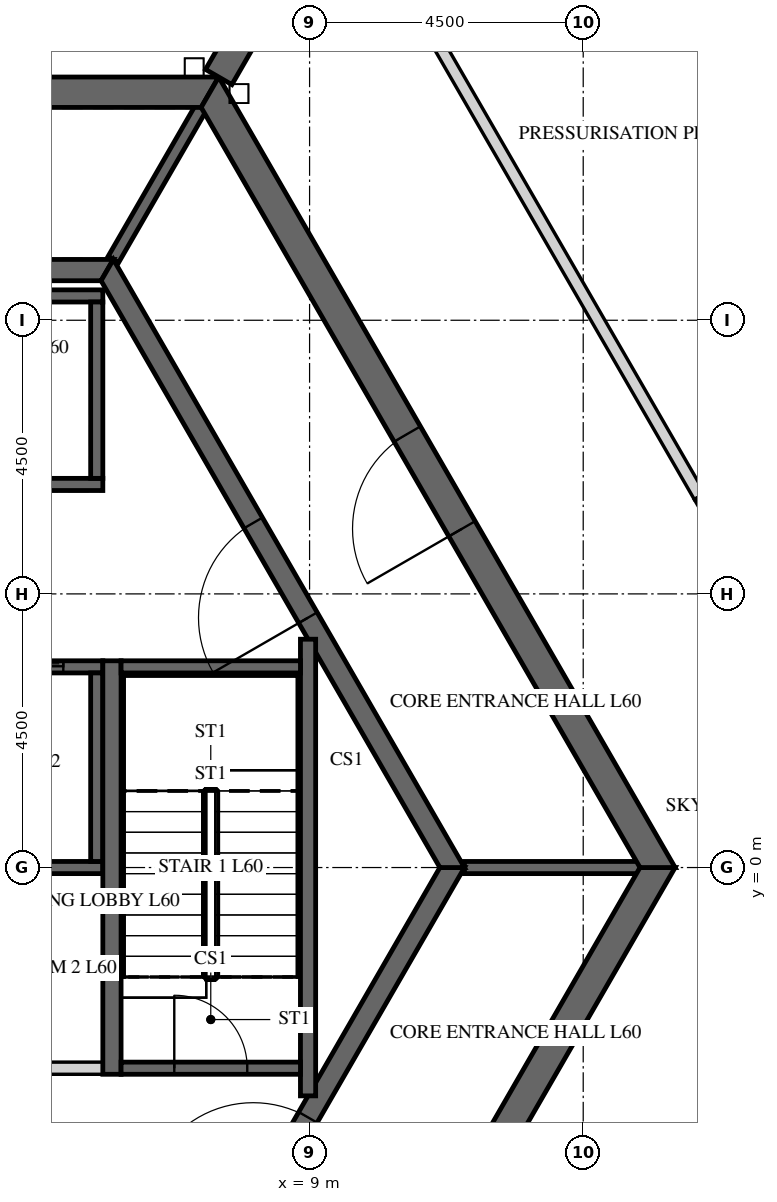
"""IFC4 building model, lengths in metres.
Left out: names, types, materials, properties, quantities, classifications, styles, units other than length and angle.
Written with IfcOpenShell. Run it as: python <this file> out.ifc"""

import sys

from ifc_helpers import new_model, si_unit, direction, frame, frame_2d, origin, place, context, subcontext, project, spatial, polyline, rectangle, outline, extrude, element, fill, save


model = new_model("IFC4")
c1 = context("Model", 3, precision=1e-05, world=origin(), true_north=direction((0.0, 1.0)))
c2 = subcontext(c1, "Body", "Model", "MODEL_VIEW")
j1 = project(units=[si_unit("LENGTHUNIT", "METRE"), si_unit("PLANEANGLEUNIT", "RADIAN")], contexts=[c1])
p1 = place(None, origin())
s1 = spatial("IfcSite", under=j1, at=p1, CompositionType="ELEMENT")
p2 = place(p1, origin())
s2 = spatial("IfcBuilding", under=s1, at=p2, CompositionType="ELEMENT")
p3 = place(p2, frame((0.0, 0.0, 250.2)))
s3 = spatial("IfcBuildingStorey", under=s2, at=p3, CompositionType="ELEMENT", Elevation=250.2)
p4 = place(p3, frame((7.361, -12.75, -0.3), z_axis=(0.0, 0.0, 1.0), x_axis=(0.50000571537, 0.866022103989, 0.0)))
e1 = element("IfcWall", 1, at=p4, inside=s3, PredefinedType="SHEAR", context=c2, shape_type="SweptSolid", body=[
    extrude(outline(polyline([(-0.144, -0.25), (14.867, -0.25), (14.578, 0.25), (0.144, 0.25), (-0.144, -0.25)])), origin(), (0.0, 0.0, 1.0), 5.8),
])
p5 = place(p4, frame((6.49, 0.0, 0.3)))
e2 = element("IfcOpeningElement", 2, at=p5, cuts=e1, PredefinedType="OPENING", context=c2, shape_type="SweptSolid", body=[
    extrude(rectangle(XDim=1.8, YDim=2.4, at=frame_2d((0.9, 1.2))), frame((0.0, 0.26, 0.0), z_axis=(0.0, -1.0, 0.0), x_axis=(1.0, 0.0, 0.0)), (0.0, 0.0, 1.0), 0.52),
])
p6 = place(p3, frame((14.722, 0.0, -0.3), z_axis=(0.0, 0.0, 1.0), x_axis=(-0.50000571537, 0.866022103989, 0.0)))
e3 = element("IfcWall", 3, at=p6, inside=s3, PredefinedType="SHEAR", context=c2, shape_type="SweptSolid", body=[
    extrude(outline(polyline([(-0.144, -0.25), (14.867, -0.25), (14.578, 0.25), (0.144, 0.25), (-0.144, -0.25)])), origin(), (0.0, 0.0, 1.0), 5.8),
])
p7 = place(p6, frame((6.432, 0.0, 0.3)))
e4 = element("IfcOpeningElement", 4, at=p7, cuts=e3, PredefinedType="OPENING", context=c2, shape_type="SweptSolid", body=[
    extrude(rectangle(XDim=1.8, YDim=2.4, at=frame_2d((0.9, 1.2))), frame((0.0, 0.26, 0.0), z_axis=(0.0, -1.0, 0.0), x_axis=(1.0, 0.0, 0.0)), (0.0, 0.0, 1.0), 0.52),
])
p8 = place(p3, frame((7.361, 12.75, -0.3), z_axis=(0.0, 0.0, 1.0), x_axis=(-1.0, 0.0, 0.0)))
e5 = element("IfcWall", 5, at=p8, inside=s3, PredefinedType="SHEAR", context=c2, shape_type="SweptSolid", body=[
    extrude(outline(polyline([(-0.144, -0.25), (14.866, -0.25), (14.578, 0.25), (0.144, 0.25), (-0.144, -0.25)])), origin(), (0.0, 0.0, 1.0), 5.8),
])
p9 = place(p8, frame((6.761, 0.0, 0.3)))
e6 = element("IfcOpeningElement", 6, at=p9, cuts=e5, PredefinedType="OPENING", context=c2, shape_type="SweptSolid", body=[
    extrude(rectangle(XDim=1.2, YDim=2.4, at=frame_2d((0.6, 1.2))), frame((0.0, 0.26, 0.0), z_axis=(0.0, -1.0, 0.0), x_axis=(1.0, 0.0, 0.0)), (0.0, 0.0, 1.0), 0.52),
])
p10 = place(p3, frame((7.506, 13.0, -0.3), z_axis=(0.0, 0.0, 1.0), x_axis=(0.499988271576, 0.866032175087, 0.0)))
e7 = element("IfcWall", 7, at=p10, inside=s3, PredefinedType="SHEAR", context=c2, shape_type="SweptSolid", body=[
    extrude(rectangle(XDim=15.424, YDim=0.5, at=frame_2d((7.712, 0.0))), origin(), (0.0, 0.0, 1.0), 5.8),
])
p11 = place(p10, frame((6.812, 0.0, 0.3)))
e8 = element("IfcOpeningElement", 8, at=p11, cuts=e7, PredefinedType="OPENING", context=c2, shape_type="SweptSolid", body=[
    extrude(rectangle(XDim=1.8, YDim=2.4, at=frame_2d((0.9, 1.2))), frame((0.0, 0.26, 0.0), z_axis=(0.0, -1.0, 0.0), x_axis=(1.0, 0.0, 0.0)), (0.0, 0.0, 1.0), 0.52),
])
p12 = place(p3, frame((5.673, -9.825, -0.3), z_axis=(0.0, 0.0, 1.0), x_axis=(0.499995046907, 0.866028263435, 0.0)))
e9 = element("IfcWall", 9, at=p12, inside=s3, PredefinedType="SHEAR", context=c2, shape_type="SweptSolid", body=[
    extrude(outline(polyline([(-0.101, -0.175), (11.446, -0.175), (11.244, 0.175), (0.101, 0.175), (-0.101, -0.175)])), origin(), (0.0, 0.0, 1.0), 5.8),
])
p13 = place(p12, frame((4.801, 0.0, 0.3)))
e10 = element("IfcOpeningElement", 10, at=p13, cuts=e9, PredefinedType="OPENING", context=c2, shape_type="SweptSolid", body=[
    extrude(rectangle(XDim=1.8, YDim=2.4, at=frame_2d((0.9, 1.2))), frame((0.0, 0.185, 0.0), z_axis=(0.0, -1.0, 0.0), x_axis=(1.0, 0.0, 0.0)), (0.0, 0.0, 1.0), 0.37),
])
p14 = place(p3, frame((11.345, 0.0, -0.3), z_axis=(0.0, 0.0, 1.0), x_axis=(-0.499995046907, 0.866028263435, 0.0)))
e11 = element("IfcWall", 11, at=p14, inside=s3, PredefinedType="SHEAR", context=c2, shape_type="SweptSolid", body=[
    extrude(outline(polyline([(-0.101, -0.175), (11.446, -0.175), (11.244, 0.175), (0.101, 0.175), (-0.101, -0.175)])), origin(), (0.0, 0.0, 1.0), 5.8),
])
p15 = place(p14, frame((4.744, 0.0, 0.3)))
e12 = element("IfcOpeningElement", 12, at=p15, cuts=e11, PredefinedType="OPENING", context=c2, shape_type="SweptSolid", body=[
    extrude(rectangle(XDim=1.8, YDim=2.4, at=frame_2d((0.9, 1.2))), frame((0.0, 0.185, 0.0), z_axis=(0.0, -1.0, 0.0), x_axis=(1.0, 0.0, 0.0)), (0.0, 0.0, 1.0), 0.37),
])
p16 = place(p3, frame((5.673, 9.825, -0.3), z_axis=(0.0, 0.0, 1.0), x_axis=(-1.0, 0.0, 0.0)))
e13 = element("IfcWall", 13, at=p16, inside=s3, PredefinedType="SHEAR", context=c2, shape_type="SweptSolid", body=[
    extrude(outline(polyline([(-0.101, -0.175), (11.446, -0.175), (11.244, 0.175), (0.101, 0.175), (-0.101, -0.175)])), origin(), (0.0, 0.0, 1.0), 5.8),
])
p17 = place(p3, frame((-5.6, 6.3, -0.25), z_axis=(0.0, 0.0, 1.0), x_axis=(1.0, 0.0, 0.0)))
e14 = element("IfcWall", 14, at=p17, inside=s3, PredefinedType="SHEAR", context=c2, shape_type="SweptSolid", body=[
    extrude(rectangle(XDim=11.2, YDim=0.2, at=frame_2d((5.6, 0.0))), origin(), (0.0, 0.0, 1.0), 5.75),
])
p18 = place(p17, frame((8.45, 0.0, 0.25)))
e15 = element("IfcOpeningElement", 15, at=p18, cuts=e14, PredefinedType="OPENING", context=c2, shape_type="SweptSolid", body=[
    extrude(rectangle(XDim=0.9, YDim=2.1, at=frame_2d((0.45, 1.05))), frame((0.0, 0.11, 0.0), z_axis=(0.0, -1.0, 0.0), x_axis=(1.0, 0.0, 0.0)), (0.0, 0.0, 1.0), 0.22),
])
p19 = place(p17, frame((0.65, 0.0, 0.25)))
e16 = element("IfcOpeningElement", 16, at=p19, cuts=e14, PredefinedType="OPENING", context=c2, shape_type="SweptSolid", body=[
    extrude(rectangle(XDim=1.1, YDim=2.1, at=frame_2d((0.55, 1.05))), frame((0.0, 0.11, 0.0), z_axis=(0.0, -1.0, 0.0), x_axis=(1.0, 0.0, 0.0)), (0.0, 0.0, 1.0), 0.22),
])
p20 = place(p17, frame((2.85, 0.0, 0.25)))
e17 = element("IfcOpeningElement", 17, at=p20, cuts=e14, PredefinedType="OPENING", context=c2, shape_type="SweptSolid", body=[
    extrude(rectangle(XDim=1.1, YDim=2.1, at=frame_2d((0.55, 1.05))), frame((0.0, 0.11, 0.0), z_axis=(0.0, -1.0, 0.0), x_axis=(1.0, 0.0, 0.0)), (0.0, 0.0, 1.0), 0.22),
])
p21 = place(p17, frame((5.05, 0.0, 0.25)))
e18 = element("IfcOpeningElement", 18, at=p21, cuts=e14, PredefinedType="OPENING", context=c2, shape_type="SweptSolid", body=[
    extrude(rectangle(XDim=1.1, YDim=2.1, at=frame_2d((0.55, 1.05))), frame((0.0, 0.11, 0.0), z_axis=(0.0, -1.0, 0.0), x_axis=(1.0, 0.0, 0.0)), (0.0, 0.0, 1.0), 0.22),
])
p22 = place(p3, frame((-5.6, 9.4, -0.25), z_axis=(0.0, 0.0, 1.0), x_axis=(1.0, 0.0, 0.0)))
e19 = element("IfcWall", 19, at=p22, inside=s3, PredefinedType="SHEAR", context=c2, shape_type="SweptSolid", body=[
    extrude(rectangle(XDim=11.2, YDim=0.2, at=frame_2d((5.6, 0.0))), origin(), (0.0, 0.0, 1.0), 5.75),
])
p23 = place(p3, frame((5.5, 6.4, -0.25), z_axis=(0.0, 0.0, 1.0), x_axis=(0.0, 1.0, 0.0)))
e20 = element("IfcWall", 20, at=p23, inside=s3, PredefinedType="SHEAR", context=c2, shape_type="SweptSolid", body=[
    extrude(rectangle(XDim=2.9, YDim=0.2, at=frame_2d((1.45, 0.0))), origin(), (0.0, 0.0, 1.0), 5.75),
])
p24 = place(p3, frame((-5.6, 3.3, -0.25), z_axis=(0.0, 0.0, 1.0), x_axis=(1.0, 0.0, 0.0)))
e21 = element("IfcWall", 21, at=p24, inside=s3, PredefinedType="SHEAR", context=c2, shape_type="SweptSolid", body=[
    extrude(rectangle(XDim=11.2, YDim=0.2, at=frame_2d((5.6, 0.0))), origin(), (0.0, 0.0, 1.0), 5.75),
])
p25 = place(p24, frame((0.65, 0.0, 0.25)))
e22 = element("IfcOpeningElement", 22, at=p25, cuts=e21, PredefinedType="OPENING", context=c2, shape_type="SweptSolid", body=[
    extrude(rectangle(XDim=1.1, YDim=2.1, at=frame_2d((0.55, 1.05))), frame((0.0, 0.11, 0.0), z_axis=(0.0, -1.0, 0.0), x_axis=(1.0, 0.0, 0.0)), (0.0, 0.0, 1.0), 0.22),
])
p26 = place(p24, frame((2.85, 0.0, 0.25)))
e23 = element("IfcOpeningElement", 23, at=p26, cuts=e21, PredefinedType="OPENING", context=c2, shape_type="SweptSolid", body=[
    extrude(rectangle(XDim=1.1, YDim=2.1, at=frame_2d((0.55, 1.05))), frame((0.0, 0.11, 0.0), z_axis=(0.0, -1.0, 0.0), x_axis=(1.0, 0.0, 0.0)), (0.0, 0.0, 1.0), 0.22),
])
p27 = place(p24, frame((5.05, 0.0, 0.25)))
e24 = element("IfcOpeningElement", 24, at=p27, cuts=e21, PredefinedType="OPENING", context=c2, shape_type="SweptSolid", body=[
    extrude(rectangle(XDim=1.1, YDim=2.1, at=frame_2d((0.55, 1.05))), frame((0.0, 0.11, 0.0), z_axis=(0.0, -1.0, 0.0), x_axis=(1.0, 0.0, 0.0)), (0.0, 0.0, 1.0), 0.22),
])
p28 = place(p24, frame((7.25, 0.0, 0.25)))
e25 = element("IfcOpeningElement", 25, at=p28, cuts=e21, PredefinedType="OPENING", context=c2, shape_type="SweptSolid", body=[
    extrude(rectangle(XDim=1.1, YDim=2.1, at=frame_2d((0.55, 1.05))), frame((0.0, 0.11, 0.0), z_axis=(0.0, -1.0, 0.0), x_axis=(1.0, 0.0, 0.0)), (0.0, 0.0, 1.0), 0.22),
])
p29 = place(p24, frame((9.45, 0.0, 0.25)))
e26 = element("IfcOpeningElement", 26, at=p29, cuts=e21, PredefinedType="OPENING", context=c2, shape_type="SweptSolid", body=[
    extrude(rectangle(XDim=1.1, YDim=2.1, at=frame_2d((0.55, 1.05))), frame((0.0, 0.11, 0.0), z_axis=(0.0, -1.0, 0.0), x_axis=(1.0, 0.0, 0.0)), (0.0, 0.0, 1.0), 0.22),
])
p30 = place(p3, frame((-5.6, 0.0, -0.25), z_axis=(0.0, 0.0, 1.0), x_axis=(1.0, 0.0, 0.0)))
e27 = element("IfcWall", 27, at=p30, inside=s3, PredefinedType="SHEAR", context=c2, shape_type="SweptSolid", body=[
    extrude(rectangle(XDim=11.2, YDim=0.2, at=frame_2d((5.6, 0.0))), origin(), (0.0, 0.0, 1.0), 5.75),
])
p31 = place(p3, frame((5.5, 0.1, -0.25), z_axis=(0.0, 0.0, 1.0), x_axis=(0.0, 1.0, 0.0)))
e28 = element("IfcWall", 28, at=p31, inside=s3, PredefinedType="SHEAR", context=c2, shape_type="SweptSolid", body=[
    extrude(rectangle(XDim=3.1, YDim=0.2, at=frame_2d((1.55, 0.0))), origin(), (0.0, 0.0, 1.0), 5.75),
])
p32 = place(p3, frame((0.1, -3.3, 0.0), z_axis=(0.0, 0.0, 1.0), x_axis=(1.0, 0.0, 0.0)))
e29 = element("IfcWall", 29, at=p32, inside=s3, PredefinedType="PARTITIONING", context=c2, shape_type="SweptSolid", body=[
    extrude(rectangle(XDim=5.5, YDim=0.2, at=frame_2d((2.75, 0.0))), origin(), (0.0, 0.0, 1.0), 5.5),
])
p33 = place(p32, frame((2.3, 0.0, 0.0)))
e30 = element("IfcOpeningElement", 30, at=p33, cuts=e29, PredefinedType="OPENING", context=c2, shape_type="SweptSolid", body=[
    extrude(rectangle(XDim=0.9, YDim=2.1, at=frame_2d((0.45, 1.05))), frame((0.0, 0.11, 0.0), z_axis=(0.0, -1.0, 0.0), x_axis=(1.0, 0.0, 0.0)), (0.0, 0.0, 1.0), 0.22),
])
for number, where, z_axis, x_axis in (
    (31, (11.547, 0.0, -0.3), (0.0, 0.0, 1.0), (1.0, 0.0, 0.0)),
    (32, (5.773, 10.0, -0.3), (0.0, 0.0, 1.0), (0.5, 0.866, 0.0)),
):
    element("IfcWall", number, at=place(p3, frame(where, z_axis=z_axis, x_axis=x_axis)), inside=s3, PredefinedType="SHEAR", context=c2, shape_type="SweptSolid", body=[
        extrude(rectangle(XDim=2.887, YDim=0.2, at=frame_2d((1.443, 0.0))), origin(), (0.0, 0.0, 1.0), 5.8),
    ])
p34 = place(p3, frame((5.75, -3.4, -0.25), z_axis=(0.0, 0.0, 1.0), x_axis=(0.0, 1.0, 0.0)))
e33 = element("IfcWall", 33, at=p34, inside=s3, PredefinedType="SHEAR", context=c2, shape_type="SweptSolid", body=[
    extrude(rectangle(XDim=6.8, YDim=0.3, at=frame_2d((3.4, 0.0))), origin(), (0.0, 0.0, 1.0), 5.75),
])
p35 = place(p3, frame((8.975, -3.755, -0.25), z_axis=(0.0, 0.0, 1.0), x_axis=(0.0, 1.0, 0.0)))
e34 = element("IfcWall", 34, at=p35, inside=s3, PredefinedType="SHEAR", context=c2, shape_type="SweptSolid", body=[
    extrude(rectangle(XDim=7.51, YDim=0.25, at=frame_2d((3.755, 0.0))), origin(), (0.0, 0.0, 1.0), 5.75),
])
p36 = place(p3, frame((5.9, 3.3, -0.25), z_axis=(0.0, 0.0, 1.0), x_axis=(1.0, 0.0, 0.0)))
e35 = element("IfcWall", 35, at=p36, inside=s3, PredefinedType="SHEAR", context=c2, shape_type="SweptSolid", body=[
    extrude(rectangle(XDim=2.95, YDim=0.2, at=frame_2d((1.475, 0.0))), origin(), (0.0, 0.0, 1.0), 5.75),
])
p37 = place(p3, frame((5.9, -3.3, -0.25), z_axis=(0.0, 0.0, 1.0), x_axis=(1.0, 0.0, 0.0)))
e36 = element("IfcWall", 36, at=p37, inside=s3, PredefinedType="SHEAR", context=c2, shape_type="SweptSolid", body=[
    extrude(rectangle(XDim=2.95, YDim=0.2, at=frame_2d((1.475, 0.0))), origin(), (0.0, 0.0, 1.0), 5.75),
])
p38 = place(p37, frame((0.875, 0.0, 0.25)))
e37 = element("IfcOpeningElement", 37, at=p38, cuts=e36, PredefinedType="OPENING", context=c2, shape_type="SweptSolid", body=[
    extrude(rectangle(XDim=1.2, YDim=2.4, at=frame_2d((0.6, 1.2))), frame((0.0, 0.11, 0.0), z_axis=(0.0, -1.0, 0.0), x_axis=(1.0, 0.0, 0.0)), (0.0, 0.0, 1.0), 0.22),
])
p39 = place(p3, frame((20.038, 7.934, 0.0), z_axis=(0.0, 0.0, 1.0), x_axis=(-0.500056356876, 0.865992863682, 0.0)))
e38 = element("IfcWall", 38, at=p39, inside=s3, PredefinedType="PARTITIONING", context=c2, shape_type="SweptSolid", body=[
    extrude(rectangle(XDim=15.169, YDim=0.2, at=frame_2d((7.584, 0.0))), origin(), (0.0, 0.0, 1.0), 5.5),
])
p40 = place(p39, frame((7.084, 0.0, 0.0)))
e39 = element("IfcOpeningElement", 39, at=p40, cuts=e38, PredefinedType="OPENING", context=c2, shape_type="SweptSolid", body=[
    extrude(rectangle(XDim=1.0, YDim=2.1, at=frame_2d((0.5, 1.05))), frame((0.0, 0.11, 0.0), z_axis=(0.0, -1.0, 0.0), x_axis=(1.0, 0.0, 0.0)), (0.0, 0.0, 1.0), 0.22),
])
p41 = place(p3, frame((13.859, -8.795, 0.0), z_axis=(0.0, 0.0, 1.0), x_axis=(0.500027655771, 0.866009436129, 0.0)))
e40 = element("IfcWall", 40, at=p41, inside=s3, PredefinedType="PARTITIONING", context=c2, shape_type="SweptSolid", body=[
    extrude(rectangle(XDim=10.156, YDim=0.2, at=frame_2d((5.078, 0.0))), origin(), (0.0, 0.0, 1.0), 5.5),
])
p42 = place(p3, frame((15.414, 6.103, 0.0), z_axis=(0.0, 0.0, 1.0), x_axis=(-0.50002969912, 0.86600825631, 0.0)))
e41 = element("IfcWall", 41, at=p42, inside=s3, PredefinedType="PARTITIONING", context=c2, shape_type="SweptSolid", body=[
    extrude(rectangle(XDim=11.601, YDim=0.2, at=frame_2d((5.801, 0.0))), origin(), (0.0, 0.0, 1.0), 5.5),
])
p43 = place(p3, frame((18.879, 0.1, 0.0), z_axis=(0.0, 0.0, 1.0), x_axis=(-0.499923693419, 0.866069454927, 0.0)))
e42 = element("IfcWall", 42, at=p43, inside=s3, PredefinedType="PARTITIONING", context=c2, shape_type="SweptSolid", body=[
    extrude(rectangle(XDim=6.931, YDim=0.2, at=frame_2d((3.466, 0.0))), origin(), (0.0, 0.0, 1.0), 5.5),
])
p44 = place(p3, frame((14.07, 23.87, 0.0), z_axis=(0.0, 0.0, 1.0), x_axis=(0.500014285048, -0.866017156151, 0.0)))
e43 = element("IfcWall", 43, at=p44, inside=s3, PredefinedType="PARTITIONING", context=c2, shape_type="SweptSolid", body=[
    extrude(rectangle(XDim=13.131, YDim=0.2, at=frame_2d((6.566, 0.0))), origin(), (0.0, 0.0, 1.0), 5.5),
])
p45 = place(p44, frame((6.066, 0.0, 0.0)))
e44 = element("IfcOpeningElement", 44, at=p45, cuts=e43, PredefinedType="OPENING", context=c2, shape_type="SweptSolid", body=[
    extrude(rectangle(XDim=1.0, YDim=2.1, at=frame_2d((0.5, 1.05))), frame((0.0, 0.11, 0.0), z_axis=(0.0, -1.0, 0.0), x_axis=(1.0, 0.0, 0.0)), (0.0, 0.0, 1.0), 0.22),
])
p46 = place(p7, origin())
e45 = element("IfcDoor", 45, at=p46, inside=s3, OperationType="DOUBLE_DOOR_SINGLE_SWING", PredefinedType="DOOR", context=c2, shape_type="SweptSolid", body=[
    extrude(rectangle(XDim=1.8, YDim=2.4, at=frame_2d((0.9, 1.2))), frame((0.0, 0.025, 0.0), z_axis=(0.0, -1.0, 0.0), x_axis=(1.0, 0.0, 0.0)), (0.0, 0.0, 1.0), 0.05),
])
fill(e4, e45)
p47 = place(p15, origin())
e46 = element("IfcDoor", 46, at=p47, inside=s3, OperationType="DOUBLE_DOOR_SINGLE_SWING", PredefinedType="DOOR", context=c2, shape_type="SweptSolid", body=[
    extrude(rectangle(XDim=1.8, YDim=2.4, at=frame_2d((0.9, 1.2))), frame((0.0, 0.025, 0.0), z_axis=(0.0, -1.0, 0.0), x_axis=(1.0, 0.0, 0.0)), (0.0, 0.0, 1.0), 0.05),
])
fill(e12, e46)
p48 = place(p13, origin())
e47 = element("IfcDoor", 47, at=p48, inside=s3, OperationType="DOUBLE_DOOR_SINGLE_SWING", PredefinedType="DOOR", context=c2, shape_type="SweptSolid", body=[
    extrude(rectangle(XDim=1.8, YDim=2.4, at=frame_2d((0.9, 1.2))), frame((0.0, 0.025, 0.0), z_axis=(0.0, -1.0, 0.0), x_axis=(1.0, 0.0, 0.0)), (0.0, 0.0, 1.0), 0.05),
])
fill(e10, e47)
p49 = place(p38, origin())
e48 = element("IfcDoor", 48, at=p49, inside=s3, OperationType="SINGLE_SWING_LEFT", PredefinedType="DOOR", context=c2, shape_type="SweptSolid", body=[
    extrude(rectangle(XDim=1.2, YDim=2.4, at=frame_2d((0.6, 1.2))), frame((0.0, 0.025, 0.0), z_axis=(0.0, -1.0, 0.0), x_axis=(1.0, 0.0, 0.0)), (0.0, 0.0, 1.0), 0.05),
])
fill(e37, e48)
p50 = place(p29, origin())
e49 = element("IfcDoor", 49, at=p50, inside=s3, OperationType="SLIDING_TO_LEFT", PredefinedType="DOOR", context=c2, shape_type="SweptSolid", body=[
    extrude(rectangle(XDim=1.1, YDim=2.1, at=frame_2d((0.55, 1.05))), frame((0.0, 0.025, 0.0), z_axis=(0.0, -1.0, 0.0), x_axis=(1.0, 0.0, 0.0)), (0.0, 0.0, 1.0), 0.05),
])
fill(e26, e49)
save(model, sys.argv[1])
